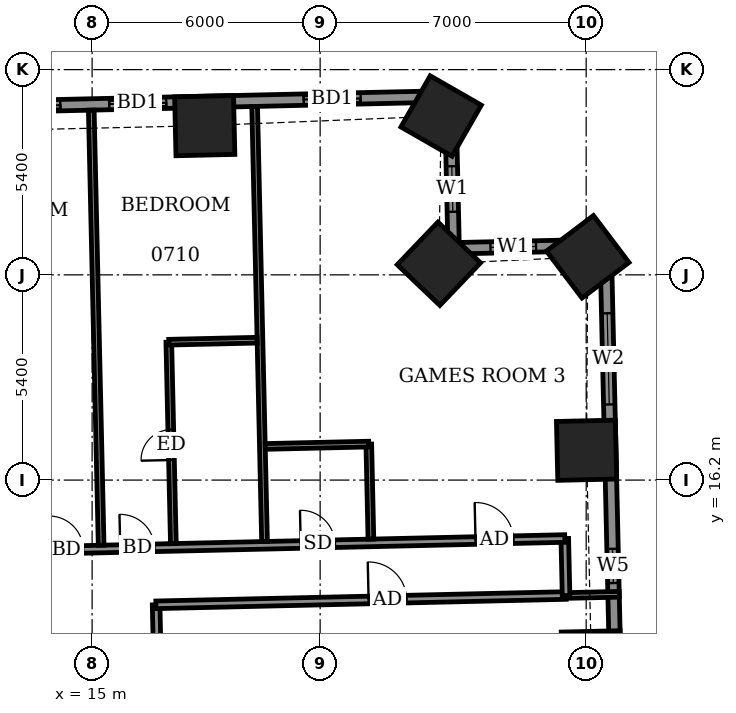
"""IFC4 building model, lengths in metres.
Left out: names, types, materials, properties, quantities, classifications, styles, units other than length and angle.
Written with IfcOpenShell. Run it as: python <this file> out.ifc"""

import sys

from ifc_helpers import new_model, si_unit, direction, frame, frame_2d, origin, origin_2d, place, context, subcontext, project, spatial, rectangle, extrude, element, fill, save


model = new_model("IFC4")
c1 = context("Model", 3, precision=1e-05, world=origin(), true_north=direction((0.0, 1.0)))
c2 = subcontext(c1, "Body", "Model", "MODEL_VIEW")
j1 = project(units=[si_unit("LENGTHUNIT", "METRE"), si_unit("PLANEANGLEUNIT", "RADIAN")], contexts=[c1])
p1 = place(None, origin())
s1 = spatial("IfcSite", under=j1, at=p1, CompositionType="ELEMENT")
p2 = place(p1, origin())
s2 = spatial("IfcBuilding", under=s1, at=p2, CompositionType="ELEMENT")
p3 = place(p2, frame((0.0, 0.0, 34.1)))
s3 = spatial("IfcBuildingStorey", under=s2, at=p3, CompositionType="ELEMENT", Elevation=34.1)
for number, where, z_axis, x_axis in (
    (1, (28.135, 11.444, -0.55), (0.0, 0.0, 1.0), (-0.023, 1.0, 0.0)),
    (2, (28.01, 16.985, -0.55), (0.0, 0.0, 1.0), (-0.023, 1.0, 0.0)),
    (3, (28.041, 22.075, -0.55), (0.0, 0.0, 1.0), (-0.604, 0.797, 0.0)),
    (4, (24.125, 21.892, -0.55), (0.0, 0.0, 1.0), (-0.723, 0.691, 0.0)),
    (5, (24.184, 25.779, -0.55), (0.0, 0.0, 1.0), (-0.868, 0.497, 0.0)),
    (6, (17.964, 25.526, -0.55), (0.0, 0.0, 1.0), (-1.0, -0.023, 0.0)),
):
    element("IfcColumn", number, at=place(p3, frame(where, z_axis=z_axis, x_axis=x_axis)), inside=s3, PredefinedType="COLUMN", context=c2, shape_type="SweptSolid", body=[
        extrude(rectangle(XDim=1.55, YDim=1.55, at=origin_2d()), origin(), (0.0, 0.0, 1.0), 3.6),
    ])
p4 = place(p3, frame((28.887, 5.864, 0.0), z_axis=(0.0, 0.0, 1.0), x_axis=(-0.022687182773, 0.999742612745, 0.0)))
e7 = element("IfcWall", 7, at=p4, inside=s3, PredefinedType="SOLIDWALL", context=c2, shape_type="SweptSolid", body=[
    extrude(rectangle(XDim=16.529, YDim=0.3, at=frame_2d((8.265, 0.0))), origin(), (0.0, 0.0, 1.0), 3.05),
])
p5 = place(p4, frame((2.929, 0.0, 0.0)))
e8 = element("IfcOpeningElement", 8, at=p5, cuts=e7, PredefinedType="OPENING", context=c2, shape_type="SweptSolid", body=[
    extrude(rectangle(XDim=1.5, YDim=2.4, at=frame_2d((0.75, 1.2))), frame((0.0, 0.16, 0.0), z_axis=(0.0, -1.0, 0.0), x_axis=(1.0, 0.0, 0.0)), (0.0, 0.0, 1.0), 0.32),
])
p6 = place(p4, frame((7.629, 0.0, 0.9)))
e9 = element("IfcOpeningElement", 9, at=p6, cuts=e7, PredefinedType="OPENING", context=c2, shape_type="SweptSolid", body=[
    extrude(rectangle(XDim=0.9, YDim=1.5, at=frame_2d((0.45, 0.75))), frame((0.0, 0.16, 0.0), z_axis=(0.0, -1.0, 0.0), x_axis=(1.0, 0.0, 0.0)), (0.0, 0.0, 1.0), 0.32),
])
p7 = place(p4, frame((12.329, 0.0, 0.9)))
e10 = element("IfcOpeningElement", 10, at=p7, cuts=e7, PredefinedType="OPENING", context=c2, shape_type="SweptSolid", body=[
    extrude(rectangle(XDim=2.4, YDim=1.5, at=frame_2d((1.2, 0.75))), frame((0.0, 0.16, 0.0), z_axis=(0.0, -1.0, 0.0), x_axis=(1.0, 0.0, 0.0)), (0.0, 0.0, 1.0), 0.32),
])
p8 = place(p3, frame((28.512, 22.389, 0.0), z_axis=(0.0, 0.0, 1.0), x_axis=(-0.999747725427, -0.022460754759, 0.0)))
e11 = element("IfcWall", 11, at=p8, inside=s3, PredefinedType="SOLIDWALL", context=c2, shape_type="SweptSolid", body=[
    extrude(rectangle(XDim=4.0, YDim=0.3, at=frame_2d((2.0, 0.0))), origin(), (0.0, 0.0, 1.0), 2.55),
])
p9 = place(p8, frame((1.831, 0.0, 0.9)))
e12 = element("IfcOpeningElement", 12, at=p9, cuts=e11, PredefinedType="OPENING", context=c2, shape_type="SweptSolid", body=[
    extrude(rectangle(XDim=1.2, YDim=1.5, at=frame_2d((0.6, 0.75))), frame((0.0, 0.16, 0.0), z_axis=(0.0, -1.0, 0.0), x_axis=(1.0, 0.0, 0.0)), (0.0, 0.0, 1.0), 0.32),
])
p10 = place(p3, frame((24.513, 22.299, 0.0), z_axis=(0.0, 0.0, 1.0), x_axis=(-0.022460754759, 0.999747725427, 0.0)))
e13 = element("IfcWall", 13, at=p10, inside=s3, PredefinedType="SOLIDWALL", context=c2, shape_type="SweptSolid", body=[
    extrude(rectangle(XDim=4.0, YDim=0.3, at=frame_2d((2.0, 0.0))), origin(), (0.0, 0.0, 1.0), 2.55),
])
p11 = place(p10, frame((0.96, 0.0, 0.9)))
e14 = element("IfcOpeningElement", 14, at=p11, cuts=e13, PredefinedType="OPENING", context=c2, shape_type="SweptSolid", body=[
    extrude(rectangle(XDim=1.2, YDim=1.5, at=frame_2d((0.6, 0.75))), frame((0.0, 0.16, 0.0), z_axis=(0.0, -1.0, 0.0), x_axis=(1.0, 0.0, 0.0)), (0.0, 0.0, 1.0), 0.32),
])
p12 = place(p3, frame((24.423, 26.298, 0.0), z_axis=(0.0, 0.0, 1.0), x_axis=(-0.999742433108, -0.022695097355, 0.0)))
e15 = element("IfcWall", 15, at=p12, inside=s3, PredefinedType="SOLIDWALL", context=c2, shape_type="SweptSolid", body=[
    extrude(rectangle(XDim=52.701, YDim=0.3, at=frame_2d((26.35, 0.0))), origin(), (0.0, 0.0, 1.0), 3.05),
])
p13 = place(p12, frame((2.357, 0.0, 0.0)))
e16 = element("IfcOpeningElement", 16, at=p13, cuts=e15, PredefinedType="OPENING", context=c2, shape_type="SweptSolid", body=[
    extrude(rectangle(XDim=1.5, YDim=2.4, at=frame_2d((0.75, 1.2))), frame((0.0, 0.16, 0.0), z_axis=(0.0, -1.0, 0.0), x_axis=(1.0, 0.0, 0.0)), (0.0, 0.0, 1.0), 0.32),
])
p14 = place(p12, frame((7.475, 0.0, 0.0)))
e17 = element("IfcOpeningElement", 17, at=p14, cuts=e15, PredefinedType="OPENING", context=c2, shape_type="SweptSolid", body=[
    extrude(rectangle(XDim=1.5, YDim=2.4, at=frame_2d((0.75, 1.2))), frame((0.0, 0.16, 0.0), z_axis=(0.0, -1.0, 0.0), x_axis=(1.0, 0.0, 0.0)), (0.0, 0.0, 1.0), 0.32),
])
p15 = place(p12, frame((10.262, 0.0, 0.0)))
e18 = element("IfcOpeningElement", 18, at=p15, cuts=e15, PredefinedType="OPENING", context=c2, shape_type="SweptSolid", body=[
    extrude(rectangle(XDim=1.5, YDim=2.4, at=frame_2d((0.75, 1.2))), frame((0.0, 0.16, 0.0), z_axis=(0.0, -1.0, 0.0), x_axis=(1.0, 0.0, 0.0)), (0.0, 0.0, 1.0), 0.32),
])
p16 = place(p12, frame((15.1, 0.0, 0.0)))
e19 = element("IfcOpeningElement", 19, at=p16, cuts=e15, PredefinedType="OPENING", context=c2, shape_type="SweptSolid", body=[
    extrude(rectangle(XDim=1.5, YDim=2.4, at=frame_2d((0.75, 1.2))), frame((0.0, 0.16, 0.0), z_axis=(0.0, -1.0, 0.0), x_axis=(1.0, 0.0, 0.0)), (0.0, 0.0, 1.0), 0.32),
])
p17 = place(p12, frame((20.7, 0.0, 0.0)))
e20 = element("IfcOpeningElement", 20, at=p17, cuts=e15, PredefinedType="OPENING", context=c2, shape_type="SweptSolid", body=[
    extrude(rectangle(XDim=1.2, YDim=2.4, at=frame_2d((0.6, 1.2))), frame((0.0, 0.16, 0.0), z_axis=(0.0, -1.0, 0.0), x_axis=(1.0, 0.0, 0.0)), (0.0, 0.0, 1.0), 0.32),
])
p18 = place(p12, frame((23.337, 0.0, 0.0)))
e21 = element("IfcOpeningElement", 21, at=p18, cuts=e15, PredefinedType="OPENING", context=c2, shape_type="SweptSolid", body=[
    extrude(rectangle(XDim=1.5, YDim=2.4, at=frame_2d((0.75, 1.2))), frame((0.0, 0.16, 0.0), z_axis=(0.0, -1.0, 0.0), x_axis=(1.0, 0.0, 0.0)), (0.0, 0.0, 1.0), 0.32),
])
p19 = place(p12, frame((28.238, 0.0, 0.0)))
e22 = element("IfcOpeningElement", 22, at=p19, cuts=e15, PredefinedType="OPENING", context=c2, shape_type="SweptSolid", body=[
    extrude(rectangle(XDim=1.5, YDim=2.4, at=frame_2d((0.75, 1.2))), frame((0.0, 0.16, 0.0), z_axis=(0.0, -1.0, 0.0), x_axis=(1.0, 0.0, 0.0)), (0.0, 0.0, 1.0), 0.32),
])
p20 = place(p12, frame((33.9, 0.0, 0.0)))
e23 = element("IfcOpeningElement", 23, at=p20, cuts=e15, PredefinedType="OPENING", context=c2, shape_type="SweptSolid", body=[
    extrude(rectangle(XDim=1.2, YDim=2.4, at=frame_2d((0.6, 1.2))), frame((0.0, 0.16, 0.0), z_axis=(0.0, -1.0, 0.0), x_axis=(1.0, 0.0, 0.0)), (0.0, 0.0, 1.0), 0.32),
])
p21 = place(p12, frame((36.538, 0.0, 0.0)))
e24 = element("IfcOpeningElement", 24, at=p21, cuts=e15, PredefinedType="OPENING", context=c2, shape_type="SweptSolid", body=[
    extrude(rectangle(XDim=1.5, YDim=2.4, at=frame_2d((0.75, 1.2))), frame((0.0, 0.16, 0.0), z_axis=(0.0, -1.0, 0.0), x_axis=(1.0, 0.0, 0.0)), (0.0, 0.0, 1.0), 0.32),
])
p22 = place(p12, frame((41.338, 0.0, 0.0)))
e25 = element("IfcOpeningElement", 25, at=p22, cuts=e15, PredefinedType="OPENING", context=c2, shape_type="SweptSolid", body=[
    extrude(rectangle(XDim=1.5, YDim=2.4, at=frame_2d((0.75, 1.2))), frame((0.0, 0.16, 0.0), z_axis=(0.0, -1.0, 0.0), x_axis=(1.0, 0.0, 0.0)), (0.0, 0.0, 1.0), 0.32),
])
p23 = place(p12, frame((44.4, 0.0, 0.9)))
e26 = element("IfcOpeningElement", 26, at=p23, cuts=e15, PredefinedType="OPENING", context=c2, shape_type="SweptSolid", body=[
    extrude(rectangle(XDim=0.9, YDim=1.5, at=frame_2d((0.45, 0.75))), frame((0.0, 0.16, 0.0), z_axis=(0.0, -1.0, 0.0), x_axis=(1.0, 0.0, 0.0)), (0.0, 0.0, 1.0), 0.32),
])
p24 = place(p12, frame((48.764, 0.0, 0.9)))
e27 = element("IfcOpeningElement", 27, at=p24, cuts=e15, PredefinedType="OPENING", context=c2, shape_type="SweptSolid", body=[
    extrude(rectangle(XDim=2.4, YDim=1.5, at=frame_2d((1.2, 0.75))), frame((0.0, 0.16, 0.0), z_axis=(0.0, -1.0, 0.0), x_axis=(1.0, 0.0, 0.0)), (0.0, 0.0, 1.0), 0.32),
])
p25 = place(p3, frame((16.803, 7.675, 0.0), z_axis=(0.0, 0.0, 1.0), x_axis=(-0.022667483124, 0.999743059595, 0.0)))
e28 = element("IfcWall", 28, at=p25, inside=s3, PredefinedType="PARTITIONING", context=c2, shape_type="SweptSolid", body=[
    extrude(rectangle(XDim=5.245, YDim=0.2, at=frame_2d((2.623, 0.0))), origin(), (0.0, 0.0, 1.0), 3.05),
])
p26 = place(p3, frame((16.679, 12.918, 0.0), z_axis=(0.0, 0.0, 1.0), x_axis=(0.999742162372, 0.022707020428, 0.0)))
e29 = element("IfcWall", 29, at=p26, inside=s3, PredefinedType="PARTITIONING", context=c2, shape_type="SweptSolid", body=[
    extrude(rectangle(XDim=10.795, YDim=0.2, at=frame_2d((5.397, 0.0))), origin(), (0.0, 0.0, 1.0), 3.05),
])
p27 = place(p26, frame((5.598, 0.0, 0.0)))
e30 = element("IfcOpeningElement", 30, at=p27, cuts=e29, PredefinedType="OPENING", context=c2, shape_type="SweptSolid", body=[
    extrude(rectangle(XDim=1.0, YDim=2.1, at=frame_2d((0.5, 1.05))), frame((0.0, 0.11, 0.0), z_axis=(0.0, -1.0, 0.0), x_axis=(1.0, 0.0, 0.0)), (0.0, 0.0, 1.0), 0.22),
])
p28 = place(p3, frame((27.471, 13.163, 0.0), z_axis=(0.0, 0.0, 1.0), x_axis=(0.999739219063, 0.022836240226, 0.0)))
e31 = element("IfcWall", 31, at=p28, inside=s3, PredefinedType="PARTITIONING", context=c2, shape_type="SweptSolid", body=[
    extrude(rectangle(XDim=1.4, YDim=0.15, at=frame_2d((0.7, 0.0))), origin(), (0.0, 0.0, 1.0), 2.55),
])
p29 = place(p3, frame((27.471, 13.163, 0.0), z_axis=(0.0, 0.0, 1.0), x_axis=(-0.022617910375, 0.999744182344, 0.0)))
e32 = element("IfcWall", 32, at=p29, inside=s3, PredefinedType="PARTITIONING", context=c2, shape_type="SweptSolid", body=[
    extrude(rectangle(XDim=1.5, YDim=0.2, at=frame_2d((0.75, 0.0))), origin(), (0.0, 0.0, 1.0), 3.05),
])
p30 = place(p3, frame((-31.347, 13.329, 0.0), z_axis=(0.0, 0.0, 1.0), x_axis=(0.999742613079, 0.022687168058, 0.0)))
e33 = element("IfcWall", 33, at=p30, inside=s3, PredefinedType="PARTITIONING", context=c2, shape_type="SweptSolid", body=[
    extrude(rectangle(XDim=58.799, YDim=0.2, at=frame_2d((29.399, 0.0))), origin(), (0.0, 0.0, 1.0), 3.05),
])
p31 = place(p30, frame((56.45, 0.0, 0.0)))
e34 = element("IfcOpeningElement", 34, at=p31, cuts=e33, PredefinedType="OPENING", context=c2, shape_type="SweptSolid", body=[
    extrude(rectangle(XDim=1.0, YDim=2.1, at=frame_2d((0.5, 1.05))), frame((0.0, 0.11, 0.0), z_axis=(0.0, -1.0, 0.0), x_axis=(1.0, 0.0, 0.0)), (0.0, 0.0, 1.0), 0.22),
])
p32 = place(p30, frame((51.85, 0.0, 0.0)))
e35 = element("IfcOpeningElement", 35, at=p32, cuts=e33, PredefinedType="OPENING", context=c2, shape_type="SweptSolid", body=[
    extrude(rectangle(XDim=0.9, YDim=2.1, at=frame_2d((0.45, 1.05))), frame((0.0, 0.11, 0.0), z_axis=(0.0, -1.0, 0.0), x_axis=(1.0, 0.0, 0.0)), (0.0, 0.0, 1.0), 0.22),
])
p33 = place(p30, frame((47.1, 0.0, 0.0)))
e36 = element("IfcOpeningElement", 36, at=p33, cuts=e33, PredefinedType="OPENING", context=c2, shape_type="SweptSolid", body=[
    extrude(rectangle(XDim=0.9, YDim=2.1, at=frame_2d((0.45, 1.05))), frame((0.0, 0.11, 0.0), z_axis=(0.0, -1.0, 0.0), x_axis=(1.0, 0.0, 0.0)), (0.0, 0.0, 1.0), 0.22),
])
p34 = place(p30, frame((45.225, 0.0, 0.0)))
e37 = element("IfcOpeningElement", 37, at=p34, cuts=e33, PredefinedType="OPENING", context=c2, shape_type="SweptSolid", body=[
    extrude(rectangle(XDim=0.9, YDim=2.1, at=frame_2d((0.45, 1.05))), frame((0.0, 0.11, 0.0), z_axis=(0.0, -1.0, 0.0), x_axis=(1.0, 0.0, 0.0)), (0.0, 0.0, 1.0), 0.22),
])
p35 = place(p30, frame((38.55, 0.0, 0.0)))
e38 = element("IfcOpeningElement", 38, at=p35, cuts=e33, PredefinedType="OPENING", context=c2, shape_type="SweptSolid", body=[
    extrude(rectangle(XDim=0.9, YDim=2.1, at=frame_2d((0.45, 1.05))), frame((0.0, 0.11, 0.0), z_axis=(0.0, -1.0, 0.0), x_axis=(1.0, 0.0, 0.0)), (0.0, 0.0, 1.0), 0.22),
])
p36 = place(p30, frame((36.625, 0.0, 0.0)))
e39 = element("IfcOpeningElement", 39, at=p36, cuts=e33, PredefinedType="OPENING", context=c2, shape_type="SweptSolid", body=[
    extrude(rectangle(XDim=0.9, YDim=2.1, at=frame_2d((0.45, 1.05))), frame((0.0, 0.11, 0.0), z_axis=(0.0, -1.0, 0.0), x_axis=(1.0, 0.0, 0.0)), (0.0, 0.0, 1.0), 0.22),
])
p37 = place(p30, frame((29.875, 0.0, 0.0)))
e40 = element("IfcOpeningElement", 40, at=p37, cuts=e33, PredefinedType="OPENING", context=c2, shape_type="SweptSolid", body=[
    extrude(rectangle(XDim=0.9, YDim=2.1, at=frame_2d((0.45, 1.05))), frame((0.0, 0.11, 0.0), z_axis=(0.0, -1.0, 0.0), x_axis=(1.0, 0.0, 0.0)), (0.0, 0.0, 1.0), 0.22),
])
p38 = place(p30, frame((27.9, 0.0, 0.0)))
e41 = element("IfcOpeningElement", 41, at=p38, cuts=e33, PredefinedType="OPENING", context=c2, shape_type="SweptSolid", body=[
    extrude(rectangle(XDim=0.9, YDim=2.1, at=frame_2d((0.45, 1.05))), frame((0.0, 0.11, 0.0), z_axis=(0.0, -1.0, 0.0), x_axis=(1.0, 0.0, 0.0)), (0.0, 0.0, 1.0), 0.22),
])
p39 = place(p30, frame((21.1, 0.0, 0.0)))
e42 = element("IfcOpeningElement", 42, at=p39, cuts=e33, PredefinedType="OPENING", context=c2, shape_type="SweptSolid", body=[
    extrude(rectangle(XDim=0.9, YDim=2.1, at=frame_2d((0.45, 1.05))), frame((0.0, 0.11, 0.0), z_axis=(0.0, -1.0, 0.0), x_axis=(1.0, 0.0, 0.0)), (0.0, 0.0, 1.0), 0.22),
])
p40 = place(p30, frame((19.175, 0.0, 0.0)))
e43 = element("IfcOpeningElement", 43, at=p40, cuts=e33, PredefinedType="OPENING", context=c2, shape_type="SweptSolid", body=[
    extrude(rectangle(XDim=0.9, YDim=2.1, at=frame_2d((0.45, 1.05))), frame((0.0, 0.11, 0.0), z_axis=(0.0, -1.0, 0.0), x_axis=(1.0, 0.0, 0.0)), (0.0, 0.0, 1.0), 0.22),
])
p41 = place(p30, frame((12.5, 0.0, 0.0)))
e44 = element("IfcOpeningElement", 44, at=p41, cuts=e33, PredefinedType="OPENING", context=c2, shape_type="SweptSolid", body=[
    extrude(rectangle(XDim=0.9, YDim=2.1, at=frame_2d((0.45, 1.05))), frame((0.0, 0.11, 0.0), z_axis=(0.0, -1.0, 0.0), x_axis=(1.0, 0.0, 0.0)), (0.0, 0.0, 1.0), 0.22),
])
p42 = place(p30, frame((10.575, 0.0, 0.0)))
e45 = element("IfcOpeningElement", 45, at=p42, cuts=e33, PredefinedType="OPENING", context=c2, shape_type="SweptSolid", body=[
    extrude(rectangle(XDim=0.9, YDim=2.1, at=frame_2d((0.45, 1.05))), frame((0.0, 0.11, 0.0), z_axis=(0.0, -1.0, 0.0), x_axis=(1.0, 0.0, 0.0)), (0.0, 0.0, 1.0), 0.22),
])
p43 = place(p30, frame((1.425, 0.0, 0.0)))
e46 = element("IfcOpeningElement", 46, at=p43, cuts=e33, PredefinedType="OPENING", context=c2, shape_type="SweptSolid", body=[
    extrude(rectangle(XDim=1.0, YDim=2.1, at=frame_2d((0.5, 1.05))), frame((0.0, 0.11, 0.0), z_axis=(0.0, -1.0, 0.0), x_axis=(1.0, 0.0, 0.0)), (0.0, 0.0, 1.0), 0.22),
])
p44 = place(p30, frame((6.0, 0.0, 0.0)))
e47 = element("IfcOpeningElement", 47, at=p44, cuts=e33, PredefinedType="OPENING", context=c2, shape_type="SweptSolid", body=[
    extrude(rectangle(XDim=0.9, YDim=2.1, at=frame_2d((0.45, 1.05))), frame((0.0, 0.11, 0.0), z_axis=(0.0, -1.0, 0.0), x_axis=(1.0, 0.0, 0.0)), (0.0, 0.0, 1.0), 0.22),
])
p45 = place(p3, frame((15.238, 14.486, 0.0), z_axis=(0.0, 0.0, 1.0), x_axis=(-0.022706391805, 0.999742176649, 0.0)))
e48 = element("IfcWall", 48, at=p45, inside=s3, PredefinedType="PARTITIONING", context=c2, shape_type="SweptSolid", body=[
    extrude(rectangle(XDim=11.451, YDim=0.15, at=frame_2d((5.726, 0.0))), origin(), (0.0, 0.0, 1.0), 2.55),
])
p46 = place(p3, frame((17.138, 14.529, 0.0), z_axis=(0.0, 0.0, 1.0), x_axis=(-0.022616771387, 0.999744208111, 0.0)))
e49 = element("IfcWall", 49, at=p46, inside=s3, PredefinedType="PARTITIONING", context=c2, shape_type="SweptSolid", body=[
    extrude(rectangle(XDim=5.3, YDim=0.15, at=frame_2d((2.65, 0.0))), origin(), (0.0, 0.0, 1.0), 3.05),
])
p47 = place(p46, frame((2.2, 0.0, 0.0)))
e50 = element("IfcOpeningElement", 50, at=p47, cuts=e49, PredefinedType="OPENING", context=c2, shape_type="SweptSolid", body=[
    extrude(rectangle(XDim=0.8, YDim=2.1, at=frame_2d((0.4, 1.05))), frame((0.0, 0.085, 0.0), z_axis=(0.0, -1.0, 0.0), x_axis=(1.0, 0.0, 0.0)), (0.0, 0.0, 1.0), 0.17),
])
p48 = place(p3, frame((19.537, 14.584, 0.0), z_axis=(0.0, 0.0, 1.0), x_axis=(-0.022708327922, 0.999742132674, 0.0)))
e51 = element("IfcWall", 51, at=p48, inside=s3, PredefinedType="PARTITIONING", context=c2, shape_type="SweptSolid", body=[
    extrude(rectangle(XDim=11.45, YDim=0.15, at=frame_2d((5.725, 0.0))), origin(), (0.0, 0.0, 1.0), 2.55),
])
p49 = place(p3, frame((22.336, 14.647, 0.0), z_axis=(0.0, 0.0, 1.0), x_axis=(-0.022357691225, 0.99975003558, 0.0)))
e52 = element("IfcWall", 52, at=p49, inside=s3, PredefinedType="PARTITIONING", context=c2, shape_type="SweptSolid", body=[
    extrude(rectangle(XDim=2.501, YDim=0.15, at=frame_2d((1.25, 0.0))), origin(), (0.0, 0.0, 1.0), 3.05),
])
p50 = place(p3, frame((19.555, 17.085, 0.0), z_axis=(0.0, 0.0, 1.0), x_axis=(0.999741187782, 0.022749889061, 0.0)))
e53 = element("IfcWall", 53, at=p50, inside=s3, PredefinedType="PARTITIONING", context=c2, shape_type="SweptSolid", body=[
    extrude(rectangle(XDim=2.726, YDim=0.15, at=frame_2d((1.363, 0.0))), origin(), (0.0, 0.0, 1.0), 3.05),
])
p51 = place(p3, frame((17.018, 19.828, 0.0), z_axis=(0.0, 0.0, 1.0), x_axis=(0.999737862264, 0.022895561926, 0.0)))
e54 = element("IfcWall", 54, at=p51, inside=s3, PredefinedType="PARTITIONING", context=c2, shape_type="SweptSolid", body=[
    extrude(rectangle(XDim=2.324, YDim=0.15, at=frame_2d((1.162, 0.0))), origin(), (0.0, 0.0, 1.0), 3.05),
])
p52 = place(p6, origin())
e55 = element("IfcWindow", 55, at=p52, inside=s3, PartitioningType="SINGLE_PANEL", PredefinedType="WINDOW", context=c2, shape_type="SweptSolid", body=[
    extrude(rectangle(XDim=0.9, YDim=1.5, at=frame_2d((0.45, 0.75))), frame((0.0, 0.03, 0.0), z_axis=(0.0, -1.0, 0.0), x_axis=(1.0, 0.0, 0.0)), (0.0, 0.0, 1.0), 0.06),
])
fill(e9, e55)
p53 = place(p7, origin())
e56 = element("IfcWindow", 56, at=p53, inside=s3, PartitioningType="DOUBLE_PANEL_VERTICAL", PredefinedType="WINDOW", context=c2, shape_type="SweptSolid", body=[
    extrude(rectangle(XDim=2.4, YDim=1.5, at=frame_2d((1.2, 0.75))), frame((0.0, 0.03, 0.0), z_axis=(0.0, -1.0, 0.0), x_axis=(1.0, 0.0, 0.0)), (0.0, 0.0, 1.0), 0.06),
])
fill(e10, e56)
p54 = place(p9, origin())
e57 = element("IfcWindow", 57, at=p54, inside=s3, PartitioningType="SINGLE_PANEL", PredefinedType="WINDOW", context=c2, shape_type="SweptSolid", body=[
    extrude(rectangle(XDim=1.2, YDim=1.5, at=frame_2d((0.6, 0.75))), frame((0.0, 0.03, 0.0), z_axis=(0.0, -1.0, 0.0), x_axis=(1.0, 0.0, 0.0)), (0.0, 0.0, 1.0), 0.06),
])
fill(e12, e57)
p55 = place(p11, origin())
e58 = element("IfcWindow", 58, at=p55, inside=s3, PartitioningType="SINGLE_PANEL", PredefinedType="WINDOW", context=c2, shape_type="SweptSolid", body=[
    extrude(rectangle(XDim=1.2, YDim=1.5, at=frame_2d((0.6, 0.75))), frame((0.0, 0.03, 0.0), z_axis=(0.0, -1.0, 0.0), x_axis=(1.0, 0.0, 0.0)), (0.0, 0.0, 1.0), 0.06),
])
fill(e14, e58)
p56 = place(p13, origin())
e59 = element("IfcDoor", 59, at=p56, inside=s3, OperationType="SLIDING_TO_LEFT", PredefinedType="DOOR", context=c2, shape_type="SweptSolid", body=[
    extrude(rectangle(XDim=1.5, YDim=2.4, at=frame_2d((0.75, 1.2))), frame((0.0, 0.025, 0.0), z_axis=(0.0, -1.0, 0.0), x_axis=(1.0, 0.0, 0.0)), (0.0, 0.0, 1.0), 0.05),
])
fill(e16, e59)
p57 = place(p14, origin())
e60 = element("IfcDoor", 60, at=p57, inside=s3, OperationType="SLIDING_TO_LEFT", PredefinedType="DOOR", context=c2, shape_type="SweptSolid", body=[
    extrude(rectangle(XDim=1.5, YDim=2.4, at=frame_2d((0.75, 1.2))), frame((0.0, 0.025, 0.0), z_axis=(0.0, -1.0, 0.0), x_axis=(1.0, 0.0, 0.0)), (0.0, 0.0, 1.0), 0.05),
])
fill(e17, e60)
p58 = place(p15, origin())
e61 = element("IfcDoor", 61, at=p58, inside=s3, OperationType="SLIDING_TO_LEFT", PredefinedType="DOOR", context=c2, shape_type="SweptSolid", body=[
    extrude(rectangle(XDim=1.5, YDim=2.4, at=frame_2d((0.75, 1.2))), frame((0.0, 0.025, 0.0), z_axis=(0.0, -1.0, 0.0), x_axis=(1.0, 0.0, 0.0)), (0.0, 0.0, 1.0), 0.05),
])
fill(e18, e61)
p59 = place(p27, origin())
e62 = element("IfcDoor", 62, at=p59, inside=s3, OperationType="SINGLE_SWING_RIGHT", PredefinedType="DOOR", context=c2, shape_type="SweptSolid", body=[
    extrude(rectangle(XDim=1.0, YDim=2.1, at=frame_2d((0.5, 1.05))), frame((0.0, 0.025, 0.0), z_axis=(0.0, -1.0, 0.0), x_axis=(1.0, 0.0, 0.0)), (0.0, 0.0, 1.0), 0.05),
])
fill(e30, e62)
p60 = place(p31, origin())
e63 = element("IfcDoor", 63, at=p60, inside=s3, OperationType="SINGLE_SWING_LEFT", PredefinedType="DOOR", context=c2, shape_type="SweptSolid", body=[
    extrude(rectangle(XDim=1.0, YDim=2.1, at=frame_2d((0.5, 1.05))), frame((0.0, 0.025, 0.0), z_axis=(0.0, -1.0, 0.0), x_axis=(1.0, 0.0, 0.0)), (0.0, 0.0, 1.0), 0.05),
])
fill(e34, e63)
p61 = place(p32, origin())
e64 = element("IfcDoor", 64, at=p61, inside=s3, OperationType="SINGLE_SWING_RIGHT", PredefinedType="DOOR", context=c2, shape_type="SweptSolid", body=[
    extrude(rectangle(XDim=0.9, YDim=2.1, at=frame_2d((0.45, 1.05))), frame((0.0, 0.025, 0.0), z_axis=(0.0, -1.0, 0.0), x_axis=(1.0, 0.0, 0.0)), (0.0, 0.0, 1.0), 0.05),
])
fill(e35, e64)
p62 = place(p33, origin())
e65 = element("IfcDoor", 65, at=p62, inside=s3, OperationType="SINGLE_SWING_RIGHT", PredefinedType="DOOR", context=c2, shape_type="SweptSolid", body=[
    extrude(rectangle(XDim=0.9, YDim=2.1, at=frame_2d((0.45, 1.05))), frame((0.0, 0.025, 0.0), z_axis=(0.0, -1.0, 0.0), x_axis=(1.0, 0.0, 0.0)), (0.0, 0.0, 1.0), 0.05),
])
fill(e36, e65)
p63 = place(p47, origin())
e66 = element("IfcDoor", 66, at=p63, inside=s3, OperationType="SINGLE_SWING_RIGHT", PredefinedType="DOOR", context=c2, shape_type="SweptSolid", body=[
    extrude(rectangle(XDim=0.8, YDim=2.1, at=frame_2d((0.4, 1.05))), frame((0.0, 0.025, 0.0), z_axis=(0.0, -1.0, 0.0), x_axis=(1.0, 0.0, 0.0)), (0.0, 0.0, 1.0), 0.05),
])
fill(e50, e66)
p64 = place(p34, origin())
e67 = element("IfcDoor", 67, at=p64, inside=s3, OperationType="SINGLE_SWING_LEFT", PredefinedType="DOOR", context=c2, shape_type="SweptSolid", body=[
    extrude(rectangle(XDim=0.9, YDim=2.1, at=frame_2d((0.45, 1.05))), frame((0.0, 0.025, 0.0), z_axis=(0.0, -1.0, 0.0), x_axis=(1.0, 0.0, 0.0)), (0.0, 0.0, 1.0), 0.05),
])
fill(e37, e67)
save(model, sys.argv[1])
